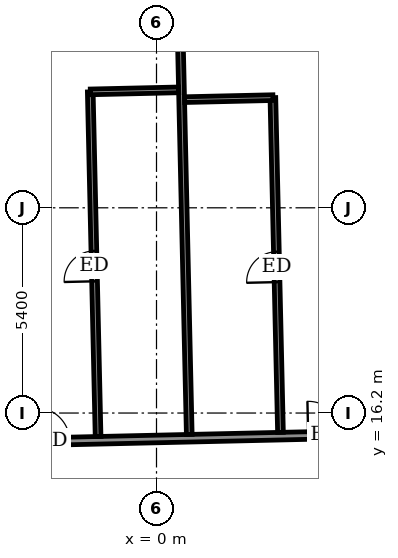
"""IFC4 building model, lengths in metres.
Left out: names, types, materials, properties, quantities, classifications, styles, units other than length and angle.
Written with IfcOpenShell. Run it as: python <this file> out.ifc"""

import sys

from ifc_helpers import new_model, si_unit, direction, frame, frame_2d, origin, place, context, subcontext, project, spatial, rectangle, extrude, element, fill, save


model = new_model("IFC4")
c1 = context("Model", 3, precision=1e-05, world=origin(), true_north=direction((0.0, 1.0)))
c2 = subcontext(c1, "Body", "Model", "MODEL_VIEW")
j1 = project(units=[si_unit("LENGTHUNIT", "METRE"), si_unit("PLANEANGLEUNIT", "RADIAN")], contexts=[c1])
p1 = place(None, origin())
s1 = spatial("IfcSite", under=j1, at=p1, CompositionType="ELEMENT")
p2 = place(p1, origin())
s2 = spatial("IfcBuilding", under=s1, at=p2, CompositionType="ELEMENT")
p3 = place(p2, frame((0.0, 0.0, 279.9)))
s3 = spatial("IfcBuildingStorey", under=s2, at=p3, CompositionType="ELEMENT", Elevation=279.9)
p4 = place(p3, frame((-26.401, 14.918, 0.0), z_axis=(0.0, 0.0, 1.0), x_axis=(0.99974239733, 0.022696673341, 0.0)))
e1 = element("IfcWall", 1, at=p4, inside=s3, PredefinedType="PARTITIONING", context=c2, shape_type="SweptSolid", body=[
    extrude(rectangle(XDim=55.386, YDim=0.2, at=frame_2d((27.693, 0.0))), origin(), (0.0, 0.0, 1.0), 3.05),
])
p5 = place(p4, frame((52.889, 0.0, 0.0)))
e2 = element("IfcOpeningElement", 2, at=p5, cuts=e1, PredefinedType="OPENING", context=c2, shape_type="SweptSolid", body=[
    extrude(rectangle(XDim=1.0, YDim=2.1, at=frame_2d((0.5, 1.05))), frame((0.0, 0.11, 0.0), z_axis=(0.0, -1.0, 0.0), x_axis=(1.0, 0.0, 0.0)), (0.0, 0.0, 1.0), 0.22),
])
p6 = place(p4, frame((48.6, 0.0, 0.0)))
e3 = element("IfcOpeningElement", 3, at=p6, cuts=e1, PredefinedType="OPENING", context=c2, shape_type="SweptSolid", body=[
    extrude(rectangle(XDim=0.9, YDim=2.1, at=frame_2d((0.45, 1.05))), frame((0.0, 0.11, 0.0), z_axis=(0.0, -1.0, 0.0), x_axis=(1.0, 0.0, 0.0)), (0.0, 0.0, 1.0), 0.22),
])
p7 = place(p4, frame((41.8, 0.0, 0.0)))
e4 = element("IfcOpeningElement", 4, at=p7, cuts=e1, PredefinedType="OPENING", context=c2, shape_type="SweptSolid", body=[
    extrude(rectangle(XDim=0.9, YDim=2.1, at=frame_2d((0.45, 1.05))), frame((0.0, 0.11, 0.0), z_axis=(0.0, -1.0, 0.0), x_axis=(1.0, 0.0, 0.0)), (0.0, 0.0, 1.0), 0.22),
])
p8 = place(p4, frame((39.675, 0.0, 0.0)))
e5 = element("IfcOpeningElement", 5, at=p8, cuts=e1, PredefinedType="OPENING", context=c2, shape_type="SweptSolid", body=[
    extrude(rectangle(XDim=0.9, YDim=2.1, at=frame_2d((0.45, 1.05))), frame((0.0, 0.11, 0.0), z_axis=(0.0, -1.0, 0.0), x_axis=(1.0, 0.0, 0.0)), (0.0, 0.0, 1.0), 0.22),
])
p9 = place(p4, frame((32.675, 0.0, 0.0)))
e6 = element("IfcOpeningElement", 6, at=p9, cuts=e1, PredefinedType="OPENING", context=c2, shape_type="SweptSolid", body=[
    extrude(rectangle(XDim=0.9, YDim=2.1, at=frame_2d((0.45, 1.05))), frame((0.0, 0.11, 0.0), z_axis=(0.0, -1.0, 0.0), x_axis=(1.0, 0.0, 0.0)), (0.0, 0.0, 1.0), 0.22),
])
p10 = place(p4, frame((30.4, 0.0, 0.0)))
e7 = element("IfcOpeningElement", 7, at=p10, cuts=e1, PredefinedType="OPENING", context=c2, shape_type="SweptSolid", body=[
    extrude(rectangle(XDim=0.9, YDim=2.1, at=frame_2d((0.45, 1.05))), frame((0.0, 0.11, 0.0), z_axis=(0.0, -1.0, 0.0), x_axis=(1.0, 0.0, 0.0)), (0.0, 0.0, 1.0), 0.22),
])
p11 = place(p4, frame((23.225, 0.0, 0.0)))
e8 = element("IfcOpeningElement", 8, at=p11, cuts=e1, PredefinedType="OPENING", context=c2, shape_type="SweptSolid", body=[
    extrude(rectangle(XDim=0.9, YDim=2.1, at=frame_2d((0.45, 1.05))), frame((0.0, 0.11, 0.0), z_axis=(0.0, -1.0, 0.0), x_axis=(1.0, 0.0, 0.0)), (0.0, 0.0, 1.0), 0.22),
])
p12 = place(p4, frame((20.9, 0.0, 0.0)))
e9 = element("IfcOpeningElement", 9, at=p12, cuts=e1, PredefinedType="OPENING", context=c2, shape_type="SweptSolid", body=[
    extrude(rectangle(XDim=0.9, YDim=2.1, at=frame_2d((0.45, 1.05))), frame((0.0, 0.11, 0.0), z_axis=(0.0, -1.0, 0.0), x_axis=(1.0, 0.0, 0.0)), (0.0, 0.0, 1.0), 0.22),
])
p13 = place(p4, frame((13.9, 0.0, 0.0)))
e10 = element("IfcOpeningElement", 10, at=p13, cuts=e1, PredefinedType="OPENING", context=c2, shape_type="SweptSolid", body=[
    extrude(rectangle(XDim=0.9, YDim=2.1, at=frame_2d((0.45, 1.05))), frame((0.0, 0.11, 0.0), z_axis=(0.0, -1.0, 0.0), x_axis=(1.0, 0.0, 0.0)), (0.0, 0.0, 1.0), 0.22),
])
p14 = place(p4, frame((11.775, 0.0, 0.0)))
e11 = element("IfcOpeningElement", 11, at=p14, cuts=e1, PredefinedType="OPENING", context=c2, shape_type="SweptSolid", body=[
    extrude(rectangle(XDim=0.9, YDim=2.1, at=frame_2d((0.45, 1.05))), frame((0.0, 0.11, 0.0), z_axis=(0.0, -1.0, 0.0), x_axis=(1.0, 0.0, 0.0)), (0.0, 0.0, 1.0), 0.22),
])
p15 = place(p4, frame((1.65, 0.0, 0.0)))
e12 = element("IfcOpeningElement", 12, at=p15, cuts=e1, PredefinedType="OPENING", context=c2, shape_type="SweptSolid", body=[
    extrude(rectangle(XDim=1.0, YDim=2.1, at=frame_2d((0.5, 1.05))), frame((0.0, 0.11, 0.0), z_axis=(0.0, -1.0, 0.0), x_axis=(1.0, 0.0, 0.0)), (0.0, 0.0, 1.0), 0.22),
])
p16 = place(p4, frame((7.025, 0.0, 0.0)))
e13 = element("IfcOpeningElement", 13, at=p16, cuts=e1, PredefinedType="OPENING", context=c2, shape_type="SweptSolid", body=[
    extrude(rectangle(XDim=0.9, YDim=2.1, at=frame_2d((0.45, 1.05))), frame((0.0, 0.11, 0.0), z_axis=(0.0, -1.0, 0.0), x_axis=(1.0, 0.0, 0.0)), (0.0, 0.0, 1.0), 0.22),
])
p17 = place(p3, frame((-1.537, 15.582, 0.0), z_axis=(0.0, 0.0, 1.0), x_axis=(-0.022690833899, 0.999742529883, 0.0)))
e14 = element("IfcWall", 14, at=p17, inside=s3, PredefinedType="PARTITIONING", context=c2, shape_type="SweptSolid", body=[
    extrude(rectangle(XDim=9.07, YDim=0.15, at=frame_2d((4.535, 0.0))), origin(), (0.0, 0.0, 1.0), 3.05),
])
p18 = place(p17, frame((4.085, 0.0, 0.0)))
e15 = element("IfcOpeningElement", 15, at=p18, cuts=e14, PredefinedType="OPENING", context=c2, shape_type="SweptSolid", body=[
    extrude(rectangle(XDim=0.8, YDim=2.1, at=frame_2d((0.4, 1.05))), frame((0.0, 0.085, 0.0), z_axis=(0.0, -1.0, 0.0), x_axis=(1.0, 0.0, 0.0)), (0.0, 0.0, 1.0), 0.17),
])
p19 = place(p3, frame((0.862, 15.637, 0.0), z_axis=(0.0, 0.0, 1.0), x_axis=(-0.022661475803, 0.999743195783, 0.0)))
e16 = element("IfcWall", 16, at=p19, inside=s3, PredefinedType="PARTITIONING", context=c2, shape_type="SweptSolid", body=[
    extrude(rectangle(XDim=12.4, YDim=0.15, at=frame_2d((6.2, 0.0))), origin(), (0.0, 0.0, 1.0), 2.5),
])
p20 = place(p3, frame((3.262, 15.691, 0.0), z_axis=(0.0, 0.0, 1.0), x_axis=(-0.022694967989, 0.999742436044, 0.0)))
e17 = element("IfcWall", 17, at=p20, inside=s3, PredefinedType="PARTITIONING", context=c2, shape_type="SweptSolid", body=[
    extrude(rectangle(XDim=8.81, YDim=0.15, at=frame_2d((4.405, 0.0))), origin(), (0.0, 0.0, 1.0), 3.05),
])
p21 = place(p20, frame((3.955, 0.0, 0.0)))
e18 = element("IfcOpeningElement", 18, at=p21, cuts=e17, PredefinedType="OPENING", context=c2, shape_type="SweptSolid", body=[
    extrude(rectangle(XDim=0.8, YDim=2.1, at=frame_2d((0.4, 1.05))), frame((0.0, 0.085, 0.0), z_axis=(0.0, -1.0, 0.0), x_axis=(1.0, 0.0, 0.0)), (0.0, 0.0, 1.0), 0.17),
])
p22 = place(p3, frame((0.74, 24.446, 0.0), z_axis=(0.0, 0.0, 1.0), x_axis=(0.999740260747, 0.02279059109, 0.0)))
e19 = element("IfcWall", 19, at=p22, inside=s3, PredefinedType="PARTITIONING", context=c2, shape_type="SweptSolid", body=[
    extrude(rectangle(XDim=2.324, YDim=0.15, at=frame_2d((1.162, 0.0))), origin(), (0.0, 0.0, 1.0), 3.05),
])
p23 = place(p3, frame((-1.741, 24.65, 0.0), z_axis=(0.0, 0.0, 1.0), x_axis=(0.999740478815, 0.022781023197, 0.0)))
e20 = element("IfcWall", 20, at=p23, inside=s3, PredefinedType="PARTITIONING", context=c2, shape_type="SweptSolid", body=[
    extrude(rectangle(XDim=2.325, YDim=0.15, at=frame_2d((1.163, 0.0))), origin(), (0.0, 0.0, 1.0), 3.05),
])
p24 = place(p10, origin())
e21 = element("IfcDoor", 21, at=p24, inside=s3, OperationType="SINGLE_SWING_RIGHT", PredefinedType="DOOR", context=c2, shape_type="SweptSolid", body=[
    extrude(rectangle(XDim=0.9, YDim=2.1, at=frame_2d((0.45, 1.05))), frame((0.0, 0.025, 0.0), z_axis=(0.0, -1.0, 0.0), x_axis=(1.0, 0.0, 0.0)), (0.0, 0.0, 1.0), 0.05),
])
fill(e7, e21)
p25 = place(p21, origin())
e22 = element("IfcDoor", 22, at=p25, inside=s3, OperationType="SINGLE_SWING_RIGHT", PredefinedType="DOOR", context=c2, shape_type="SweptSolid", body=[
    extrude(rectangle(XDim=0.8, YDim=2.1, at=frame_2d((0.4, 1.05))), frame((0.0, 0.025, 0.0), z_axis=(0.0, -1.0, 0.0), x_axis=(1.0, 0.0, 0.0)), (0.0, 0.0, 1.0), 0.05),
])
fill(e18, e22)
p26 = place(p11, origin())
e23 = element("IfcDoor", 23, at=p26, inside=s3, OperationType="SINGLE_SWING_LEFT", PredefinedType="DOOR", context=c2, shape_type="SweptSolid", body=[
    extrude(rectangle(XDim=0.9, YDim=2.1, at=frame_2d((0.45, 1.05))), frame((0.0, 0.025, 0.0), z_axis=(0.0, -1.0, 0.0), x_axis=(1.0, 0.0, 0.0)), (0.0, 0.0, 1.0), 0.05),
])
fill(e8, e23)
p27 = place(p18, origin())
e24 = element("IfcDoor", 24, at=p27, inside=s3, OperationType="SINGLE_SWING_LEFT", PredefinedType="DOOR", context=c2, shape_type="SweptSolid", body=[
    extrude(rectangle(XDim=0.8, YDim=2.1, at=frame_2d((0.4, 1.05))), frame((0.0, 0.025, 0.0), z_axis=(0.0, -1.0, 0.0), x_axis=(1.0, 0.0, 0.0)), (0.0, 0.0, 1.0), 0.05),
])
fill(e15, e24)
save(model, sys.argv[1])
